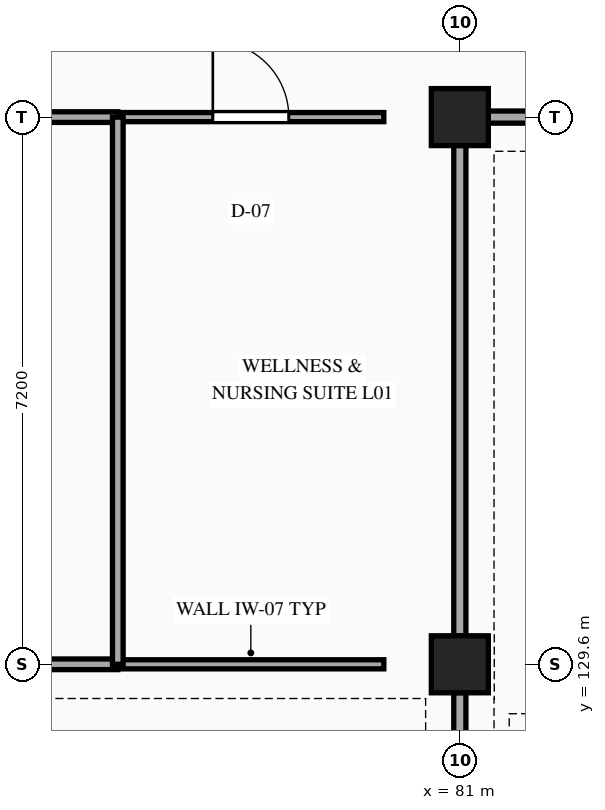
"""IFC4 building model, lengths in metres.
Left out: names, types, materials, properties, quantities, classifications, styles, units other than length and angle.
Written with IfcOpenShell. Run it as: python <this file> out.ifc"""

import sys

from ifc_helpers import new_model, si_unit, direction, frame, frame_2d, origin, origin_2d, place, context, subcontext, project, spatial, rectangle, extrude, element, fill, save


model = new_model("IFC4")
c1 = context("Model", 3, precision=1e-05, world=origin(), true_north=direction((0.0, 1.0)))
c2 = subcontext(c1, "Body", "Model", "MODEL_VIEW")
j1 = project(units=[si_unit("LENGTHUNIT", "METRE"), si_unit("PLANEANGLEUNIT", "RADIAN")], contexts=[c1])
p1 = place(None, origin())
s1 = spatial("IfcSite", under=j1, at=p1, CompositionType="ELEMENT")
p2 = place(p1, origin())
s2 = spatial("IfcBuilding", under=s1, at=p2, CompositionType="ELEMENT")
p3 = place(p2, frame((0.0, 0.0, 5.4)))
s3 = spatial("IfcBuildingStorey", under=s2, at=p3, CompositionType="ELEMENT", Elevation=5.4)
for number, where, z_axis, x_axis in (
    (1, (81.0, 129.6, 0.0), (0.0, 0.0, 1.0), (1.0, 0.0, 0.0)),
    (2, (81.0, 136.8, 0.0), (0.0, 0.0, 1.0), (1.0, 0.0, 0.0)),
):
    element("IfcColumn", number, at=place(p3, frame(where, z_axis=z_axis, x_axis=x_axis)), inside=s3, PredefinedType="COLUMN", context=c2, shape_type="SweptSolid", body=[
        extrude(rectangle(XDim=0.75, YDim=0.75, at=origin_2d()), origin(), (0.0, 0.0, 1.0), 5.4),
    ])
p4 = place(p3, frame((72.373, 129.6, 0.0), z_axis=(0.0, 0.0, 1.0), x_axis=(1.0, 0.0, 0.0)))
e3 = element("IfcWall", 3, at=p4, inside=s3, PredefinedType="PARTITIONING", context=c2, shape_type="SweptSolid", body=[
    extrude(rectangle(XDim=4.127, YDim=0.14, at=frame_2d((2.063, 0.0))), origin(), (0.0, 0.0, 1.0), 4.498),
])
p5 = place(p3, frame((76.5, 129.6, 0.0), z_axis=(0.0, 0.0, 1.0), x_axis=(1.0, 0.0, 0.0)))
e4 = element("IfcWall", 4, at=p5, inside=s3, PredefinedType="PARTITIONING", context=c2, shape_type="SweptSolid", body=[
    extrude(rectangle(XDim=3.5, YDim=0.12, at=frame_2d((1.75, 0.0))), origin(), (0.0, 0.0, 1.0), 4.498),
])
p6 = place(p3, frame((72.373, 136.8, 0.0), z_axis=(0.0, 0.0, 1.0), x_axis=(1.0, 0.0, 0.0)))
e5 = element("IfcWall", 5, at=p6, inside=s3, PredefinedType="PARTITIONING", context=c2, shape_type="SweptSolid", body=[
    extrude(rectangle(XDim=4.127, YDim=0.14, at=frame_2d((2.063, 0.0))), origin(), (0.0, 0.0, 1.0), 4.498),
])
p7 = place(p6, frame((1.588, 0.0, 0.0)))
e6 = element("IfcOpeningElement", 6, at=p7, cuts=e5, PredefinedType="OPENING", context=c2, shape_type="SweptSolid", body=[
    extrude(rectangle(XDim=0.95, YDim=2.1, at=frame_2d((0.475, 1.05))), frame((0.0, 0.08, 0.0), z_axis=(0.0, -1.0, 0.0), x_axis=(1.0, 0.0, 0.0)), (0.0, 0.0, 1.0), 0.16),
])
p8 = place(p3, frame((76.5, 136.8, 0.0), z_axis=(0.0, 0.0, 1.0), x_axis=(1.0, 0.0, 0.0)))
e7 = element("IfcWall", 7, at=p8, inside=s3, PredefinedType="PARTITIONING", context=c2, shape_type="SweptSolid", body=[
    extrude(rectangle(XDim=3.5, YDim=0.12, at=frame_2d((1.75, 0.0))), origin(), (0.0, 0.0, 1.0), 4.498),
])
p9 = place(p8, frame((1.25, 0.0, 0.0)))
e8 = element("IfcOpeningElement", 8, at=p9, cuts=e7, PredefinedType="OPENING", context=c2, shape_type="SweptSolid", body=[
    extrude(rectangle(XDim=1.0, YDim=2.15, at=frame_2d((0.5, 1.075))), frame((0.0, 0.07, 0.0), z_axis=(0.0, -1.0, 0.0), x_axis=(1.0, 0.0, 0.0)), (0.0, 0.0, 1.0), 0.14),
])
p10 = place(p3, frame((81.373, 136.8, 0.0), z_axis=(0.0, 0.0, 1.0), x_axis=(1.0, 0.0, 0.0)))
e9 = element("IfcWall", 9, at=p10, inside=s3, PredefinedType="PARTITIONING", context=c2, shape_type="SweptSolid", body=[
    extrude(rectangle(XDim=8.254, YDim=0.16, at=frame_2d((4.127, 0.0))), origin(), (0.0, 0.0, 1.0), 4.498),
])
p11 = place(p10, frame((3.227, 0.0, 0.0)))
e10 = element("IfcOpeningElement", 10, at=p11, cuts=e9, PredefinedType="OPENING", context=c2, shape_type="SweptSolid", body=[
    extrude(rectangle(XDim=1.8, YDim=2.25, at=frame_2d((0.9, 1.125))), frame((0.0, 0.09, 0.0), z_axis=(0.0, -1.0, 0.0), x_axis=(1.0, 0.0, 0.0)), (0.0, 0.0, 1.0), 0.18),
])
p12 = place(p3, frame((76.5, 129.6, 0.0), z_axis=(0.0, 0.0, 1.0), x_axis=(0.0, 1.0, 0.0)))
e11 = element("IfcWall", 11, at=p12, inside=s3, PredefinedType="PARTITIONING", context=c2, shape_type="SweptSolid", body=[
    extrude(rectangle(XDim=7.2, YDim=0.14, at=frame_2d((3.6, 0.0))), origin(), (0.0, 0.0, 1.0), 4.498),
])
p13 = place(p3, frame((81.0, 123.6, 0.0), z_axis=(0.0, 0.0, 1.0), x_axis=(0.0, 1.0, 0.0)))
e12 = element("IfcWall", 12, at=p13, inside=s3, PredefinedType="PARTITIONING", context=c2, shape_type="SweptSolid", body=[
    extrude(rectangle(XDim=5.627, YDim=0.16, at=frame_2d((2.813, 0.0))), origin(), (0.0, 0.0, 1.0), 4.508),
])
p14 = place(p3, frame((81.0, 129.973, 0.0), z_axis=(0.0, 0.0, 1.0), x_axis=(0.0, 1.0, 0.0)))
e13 = element("IfcWall", 13, at=p14, inside=s3, PredefinedType="PARTITIONING", context=c2, shape_type="SweptSolid", body=[
    extrude(rectangle(XDim=6.454, YDim=0.16, at=frame_2d((3.227, 0.0))), origin(), (0.0, 0.0, 1.0), 4.508),
])
p15 = place(p9, origin())
e14 = element("IfcDoor", 14, at=p15, inside=s3, OperationType="SINGLE_SWING_LEFT", PredefinedType="DOOR", context=c2, shape_type="SweptSolid", body=[
    extrude(rectangle(XDim=1.0, YDim=2.15, at=frame_2d((0.5, 1.075))), frame((0.0, 0.025, 0.0), z_axis=(0.0, -1.0, 0.0), x_axis=(1.0, 0.0, 0.0)), (0.0, 0.0, 1.0), 0.05),
])
fill(e8, e14)
save(model, sys.argv[1])
